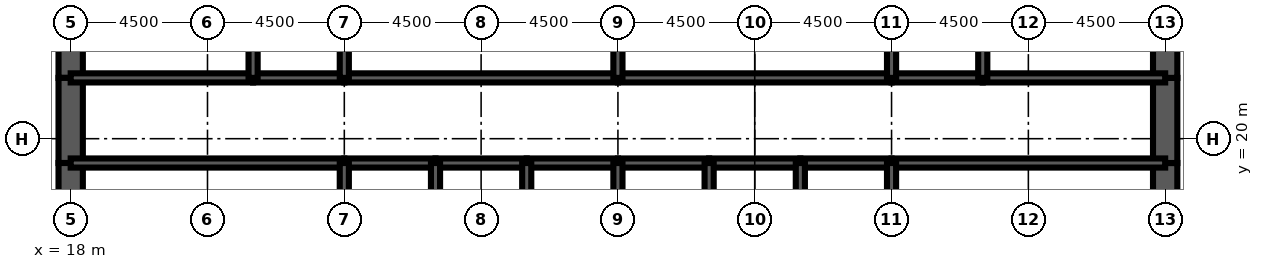
"""IFC4 building model, lengths in metres.
Left out: names, types, materials, properties, quantities, classifications, styles, units other than length and angle.
Written with IfcOpenShell. Run it as: python <this file> out.ifc"""

import sys

from ifc_helpers import new_model, si_unit, direction, frame, frame_2d, origin, place, context, subcontext, project, spatial, rectangle, extrude, element, fill, save


model = new_model("IFC4")
c1 = context("Model", 3, precision=1e-05, world=origin(), true_north=direction((0.0, 1.0)))
c2 = subcontext(c1, "Body", "Model", "MODEL_VIEW")
j1 = project(units=[si_unit("LENGTHUNIT", "METRE"), si_unit("PLANEANGLEUNIT", "RADIAN")], contexts=[c1])
p1 = place(None, origin())
s1 = spatial("IfcSite", under=j1, at=p1, CompositionType="ELEMENT")
p2 = place(p1, origin())
s2 = spatial("IfcBuilding", under=s1, at=p2, CompositionType="ELEMENT")
p3 = place(p2, frame((0.0, 0.0, 227.8)))
s3 = spatial("IfcBuildingStorey", under=s2, at=p3, CompositionType="ELEMENT", Elevation=227.8)
p4 = place(p3, frame((18.0, 26.0, 0.0), z_axis=(0.0, 0.0, 1.0), x_axis=(0.0, -1.0, 0.0)))
e1 = element("IfcWall", 1, at=p4, inside=s3, PredefinedType="SHEAR", context=c2, shape_type="SweptSolid", body=[
    extrude(rectangle(XDim=4.0, YDim=0.8, at=frame_2d((2.0, 0.0))), origin(), (0.0, 0.0, 1.0), 4.2),
])
p5 = place(p3, frame((18.0, 22.0, 0.0), z_axis=(0.0, 0.0, 1.0), x_axis=(0.0, -1.0, 0.0)))
e2 = element("IfcWall", 2, at=p5, inside=s3, PredefinedType="SHEAR", context=c2, shape_type="SweptSolid", body=[
    extrude(rectangle(XDim=2.8, YDim=0.8, at=frame_2d((1.4, 0.0))), origin(), (0.0, 0.0, 1.0), 4.2),
])
p6 = place(p5, frame((0.6, 0.0, 0.0)))
e3 = element("IfcOpeningElement", 3, at=p6, cuts=e2, PredefinedType="OPENING", context=c2, shape_type="SweptSolid", body=[
    extrude(rectangle(XDim=1.8, YDim=2.1, at=frame_2d((0.9, 1.05))), frame((0.0, 0.41, 0.0), z_axis=(0.0, -1.0, 0.0), x_axis=(1.0, 0.0, 0.0)), (0.0, 0.0, 1.0), 0.82),
])
for number, where, z_axis, x_axis in (
    (4, (18.0, 19.2, 0.0), (0.0, 0.0, 1.0), (0.0, -1.0, 0.0)),
    (5, (54.0, 16.0, 0.0), (0.0, 0.0, 1.0), (0.0, 1.0, 0.0)),
):
    element("IfcWall", number, at=place(p3, frame(where, z_axis=z_axis, x_axis=x_axis)), inside=s3, PredefinedType="SHEAR", context=c2, shape_type="SweptSolid", body=[
        extrude(rectangle(XDim=3.2, YDim=0.8, at=frame_2d((1.6, 0.0))), origin(), (0.0, 0.0, 1.0), 4.2),
    ])
p7 = place(p3, frame((54.0, 19.2, 0.0), z_axis=(0.0, 0.0, 1.0), x_axis=(0.0, 1.0, 0.0)))
e6 = element("IfcWall", 6, at=p7, inside=s3, PredefinedType="SHEAR", context=c2, shape_type="SweptSolid", body=[
    extrude(rectangle(XDim=2.8, YDim=0.8, at=frame_2d((1.4, 0.0))), origin(), (0.0, 0.0, 1.0), 4.2),
])
p8 = place(p7, frame((0.4, 0.0, 0.0)))
e7 = element("IfcOpeningElement", 7, at=p8, cuts=e6, PredefinedType="OPENING", context=c2, shape_type="SweptSolid", body=[
    extrude(rectangle(XDim=1.8, YDim=2.1, at=frame_2d((0.9, 1.05))), frame((0.0, 0.41, 0.0), z_axis=(0.0, -1.0, 0.0), x_axis=(1.0, 0.0, 0.0)), (0.0, 0.0, 1.0), 0.82),
])
p9 = place(p3, frame((54.0, 22.0, 0.0), z_axis=(0.0, 0.0, 1.0), x_axis=(0.0, 1.0, 0.0)))
e8 = element("IfcWall", 8, at=p9, inside=s3, PredefinedType="SHEAR", context=c2, shape_type="SweptSolid", body=[
    extrude(rectangle(XDim=4.0, YDim=0.8, at=frame_2d((2.0, 0.0))), origin(), (0.0, 0.0, 1.0), 4.2),
])
p10 = place(p3, frame((18.0, 19.2, 0.0), z_axis=(0.0, 0.0, 1.0), x_axis=(1.0, 0.0, 0.0)))
e9 = element("IfcWall", 9, at=p10, inside=s3, PredefinedType="SOLIDWALL", context=c2, shape_type="SweptSolid", body=[
    extrude(rectangle(XDim=9.0, YDim=0.3, at=frame_2d((4.5, 0.0))), origin(), (0.0, 0.0, 1.0), 4.2),
])
p11 = place(p10, frame((0.65, 0.0, 0.0)))
e10 = element("IfcOpeningElement", 10, at=p11, cuts=e9, PredefinedType="OPENING", context=c2, shape_type="SweptSolid", body=[
    extrude(rectangle(XDim=1.0, YDim=2.1, at=frame_2d((0.5, 1.05))), frame((0.0, 0.16, 0.0), z_axis=(0.0, -1.0, 0.0), x_axis=(1.0, 0.0, 0.0)), (0.0, 0.0, 1.0), 0.32),
])
p12 = place(p3, frame((27.0, 19.2, 0.0), z_axis=(0.0, 0.0, 1.0), x_axis=(1.0, 0.0, 0.0)))
e11 = element("IfcWall", 11, at=p12, inside=s3, PredefinedType="SOLIDWALL", context=c2, shape_type="SweptSolid", body=[
    extrude(rectangle(XDim=3.0, YDim=0.3, at=frame_2d((1.5, 0.0))), origin(), (0.0, 0.0, 1.0), 4.2),
])
p13 = place(p12, frame((0.95, 0.0, 0.0)))
e12 = element("IfcOpeningElement", 12, at=p13, cuts=e11, PredefinedType="OPENING", context=c2, shape_type="SweptSolid", body=[
    extrude(rectangle(XDim=1.1, YDim=2.2, at=frame_2d((0.55, 1.1))), frame((0.0, 0.16, 0.0), z_axis=(0.0, -1.0, 0.0), x_axis=(1.0, 0.0, 0.0)), (0.0, 0.0, 1.0), 0.32),
])
p14 = place(p3, frame((30.0, 19.2, 0.0), z_axis=(0.0, 0.0, 1.0), x_axis=(1.0, 0.0, 0.0)))
e13 = element("IfcWall", 13, at=p14, inside=s3, PredefinedType="SOLIDWALL", context=c2, shape_type="SweptSolid", body=[
    extrude(rectangle(XDim=3.0, YDim=0.3, at=frame_2d((1.5, 0.0))), origin(), (0.0, 0.0, 1.0), 4.2),
])
p15 = place(p14, frame((0.95, 0.0, 0.0)))
e14 = element("IfcOpeningElement", 14, at=p15, cuts=e13, PredefinedType="OPENING", context=c2, shape_type="SweptSolid", body=[
    extrude(rectangle(XDim=1.1, YDim=2.2, at=frame_2d((0.55, 1.1))), frame((0.0, 0.16, 0.0), z_axis=(0.0, -1.0, 0.0), x_axis=(1.0, 0.0, 0.0)), (0.0, 0.0, 1.0), 0.32),
])
p16 = place(p3, frame((33.0, 19.2, 0.0), z_axis=(0.0, 0.0, 1.0), x_axis=(1.0, 0.0, 0.0)))
e15 = element("IfcWall", 15, at=p16, inside=s3, PredefinedType="SOLIDWALL", context=c2, shape_type="SweptSolid", body=[
    extrude(rectangle(XDim=3.0, YDim=0.3, at=frame_2d((1.5, 0.0))), origin(), (0.0, 0.0, 1.0), 4.2),
])
p17 = place(p16, frame((0.95, 0.0, 0.0)))
e16 = element("IfcOpeningElement", 16, at=p17, cuts=e15, PredefinedType="OPENING", context=c2, shape_type="SweptSolid", body=[
    extrude(rectangle(XDim=1.1, YDim=2.2, at=frame_2d((0.55, 1.1))), frame((0.0, 0.16, 0.0), z_axis=(0.0, -1.0, 0.0), x_axis=(1.0, 0.0, 0.0)), (0.0, 0.0, 1.0), 0.32),
])
p18 = place(p3, frame((36.0, 19.2, 0.0), z_axis=(0.0, 0.0, 1.0), x_axis=(1.0, 0.0, 0.0)))
e17 = element("IfcWall", 17, at=p18, inside=s3, PredefinedType="SOLIDWALL", context=c2, shape_type="SweptSolid", body=[
    extrude(rectangle(XDim=3.0, YDim=0.3, at=frame_2d((1.5, 0.0))), origin(), (0.0, 0.0, 1.0), 4.2),
])
p19 = place(p18, frame((0.95, 0.0, 0.0)))
e18 = element("IfcOpeningElement", 18, at=p19, cuts=e17, PredefinedType="OPENING", context=c2, shape_type="SweptSolid", body=[
    extrude(rectangle(XDim=1.1, YDim=2.2, at=frame_2d((0.55, 1.1))), frame((0.0, 0.16, 0.0), z_axis=(0.0, -1.0, 0.0), x_axis=(1.0, 0.0, 0.0)), (0.0, 0.0, 1.0), 0.32),
])
p20 = place(p3, frame((39.0, 19.2, 0.0), z_axis=(0.0, 0.0, 1.0), x_axis=(1.0, 0.0, 0.0)))
e19 = element("IfcWall", 19, at=p20, inside=s3, PredefinedType="SOLIDWALL", context=c2, shape_type="SweptSolid", body=[
    extrude(rectangle(XDim=3.0, YDim=0.3, at=frame_2d((1.5, 0.0))), origin(), (0.0, 0.0, 1.0), 4.2),
])
p21 = place(p20, frame((1.0, 0.0, 0.0)))
e20 = element("IfcOpeningElement", 20, at=p21, cuts=e19, PredefinedType="OPENING", context=c2, shape_type="SweptSolid", body=[
    extrude(rectangle(XDim=1.0, YDim=2.1, at=frame_2d((0.5, 1.05))), frame((0.0, 0.16, 0.0), z_axis=(0.0, -1.0, 0.0), x_axis=(1.0, 0.0, 0.0)), (0.0, 0.0, 1.0), 0.32),
])
p22 = place(p3, frame((42.0, 19.2, 0.0), z_axis=(0.0, 0.0, 1.0), x_axis=(1.0, 0.0, 0.0)))
e21 = element("IfcWall", 21, at=p22, inside=s3, PredefinedType="SOLIDWALL", context=c2, shape_type="SweptSolid", body=[
    extrude(rectangle(XDim=3.0, YDim=0.3, at=frame_2d((1.5, 0.0))), origin(), (0.0, 0.0, 1.0), 4.2),
])
p23 = place(p22, frame((1.0, 0.0, 0.0)))
e22 = element("IfcOpeningElement", 22, at=p23, cuts=e21, PredefinedType="OPENING", context=c2, shape_type="SweptSolid", body=[
    extrude(rectangle(XDim=1.0, YDim=2.1, at=frame_2d((0.5, 1.05))), frame((0.0, 0.16, 0.0), z_axis=(0.0, -1.0, 0.0), x_axis=(1.0, 0.0, 0.0)), (0.0, 0.0, 1.0), 0.32),
])
p24 = place(p3, frame((45.0, 19.2, 0.0), z_axis=(0.0, 0.0, 1.0), x_axis=(1.0, 0.0, 0.0)))
e23 = element("IfcWall", 23, at=p24, inside=s3, PredefinedType="SOLIDWALL", context=c2, shape_type="SweptSolid", body=[
    extrude(rectangle(XDim=9.0, YDim=0.3, at=frame_2d((4.5, 0.0))), origin(), (0.0, 0.0, 1.0), 4.2),
])
p25 = place(p24, frame((7.35, 0.0, 0.0)))
e24 = element("IfcOpeningElement", 24, at=p25, cuts=e23, PredefinedType="OPENING", context=c2, shape_type="SweptSolid", body=[
    extrude(rectangle(XDim=1.0, YDim=2.1, at=frame_2d((0.5, 1.05))), frame((0.0, 0.16, 0.0), z_axis=(0.0, -1.0, 0.0), x_axis=(1.0, 0.0, 0.0)), (0.0, 0.0, 1.0), 0.32),
])
p26 = place(p3, frame((18.0, 22.0, 0.0), z_axis=(0.0, 0.0, 1.0), x_axis=(1.0, 0.0, 0.0)))
e25 = element("IfcWall", 25, at=p26, inside=s3, PredefinedType="SOLIDWALL", context=c2, shape_type="SweptSolid", body=[
    extrude(rectangle(XDim=6.0, YDim=0.3, at=frame_2d((3.0, 0.0))), origin(), (0.0, 0.0, 1.0), 4.2),
])
p27 = place(p26, frame((4.4, 0.0, 0.0)))
e26 = element("IfcOpeningElement", 26, at=p27, cuts=e25, PredefinedType="OPENING", context=c2, shape_type="SweptSolid", body=[
    extrude(rectangle(XDim=1.0, YDim=2.1, at=frame_2d((0.5, 1.05))), frame((0.0, 0.16, 0.0), z_axis=(0.0, -1.0, 0.0), x_axis=(1.0, 0.0, 0.0)), (0.0, 0.0, 1.0), 0.32),
])
p28 = place(p26, frame((0.65, 0.0, 0.0)))
e27 = element("IfcOpeningElement", 27, at=p28, cuts=e25, PredefinedType="OPENING", context=c2, shape_type="SweptSolid", body=[
    extrude(rectangle(XDim=1.0, YDim=2.1, at=frame_2d((0.5, 1.05))), frame((0.0, 0.16, 0.0), z_axis=(0.0, -1.0, 0.0), x_axis=(1.0, 0.0, 0.0)), (0.0, 0.0, 1.0), 0.32),
])
p29 = place(p3, frame((24.0, 22.0, 0.0), z_axis=(0.0, 0.0, 1.0), x_axis=(1.0, 0.0, 0.0)))
e28 = element("IfcWall", 28, at=p29, inside=s3, PredefinedType="SOLIDWALL", context=c2, shape_type="SweptSolid", body=[
    extrude(rectangle(XDim=3.0, YDim=0.3, at=frame_2d((1.5, 0.0))), origin(), (0.0, 0.0, 1.0), 4.2),
])
p30 = place(p29, frame((1.0, 0.0, 0.0)))
e29 = element("IfcOpeningElement", 29, at=p30, cuts=e28, PredefinedType="OPENING", context=c2, shape_type="SweptSolid", body=[
    extrude(rectangle(XDim=1.0, YDim=2.1, at=frame_2d((0.5, 1.05))), frame((0.0, 0.16, 0.0), z_axis=(0.0, -1.0, 0.0), x_axis=(1.0, 0.0, 0.0)), (0.0, 0.0, 1.0), 0.32),
])
p31 = place(p3, frame((27.0, 22.0, 0.0), z_axis=(0.0, 0.0, 1.0), x_axis=(1.0, 0.0, 0.0)))
e30 = element("IfcWall", 30, at=p31, inside=s3, PredefinedType="SOLIDWALL", context=c2, shape_type="SweptSolid", body=[
    extrude(rectangle(XDim=9.0, YDim=0.3, at=frame_2d((4.5, 0.0))), origin(), (0.0, 0.0, 1.0), 4.2),
])
p32 = place(p31, frame((4.0, 0.0, 0.0)))
e31 = element("IfcOpeningElement", 31, at=p32, cuts=e30, PredefinedType="OPENING", context=c2, shape_type="SweptSolid", body=[
    extrude(rectangle(XDim=1.0, YDim=2.1, at=frame_2d((0.5, 1.05))), frame((0.0, 0.16, 0.0), z_axis=(0.0, -1.0, 0.0), x_axis=(1.0, 0.0, 0.0)), (0.0, 0.0, 1.0), 0.32),
])
p33 = place(p3, frame((36.0, 22.0, 0.0), z_axis=(0.0, 0.0, 1.0), x_axis=(1.0, 0.0, 0.0)))
e32 = element("IfcWall", 32, at=p33, inside=s3, PredefinedType="SOLIDWALL", context=c2, shape_type="SweptSolid", body=[
    extrude(rectangle(XDim=9.0, YDim=0.3, at=frame_2d((4.5, 0.0))), origin(), (0.0, 0.0, 1.0), 4.2),
])
p34 = place(p33, frame((4.0, 0.0, 0.0)))
e33 = element("IfcOpeningElement", 33, at=p34, cuts=e32, PredefinedType="OPENING", context=c2, shape_type="SweptSolid", body=[
    extrude(rectangle(XDim=1.0, YDim=2.1, at=frame_2d((0.5, 1.05))), frame((0.0, 0.16, 0.0), z_axis=(0.0, -1.0, 0.0), x_axis=(1.0, 0.0, 0.0)), (0.0, 0.0, 1.0), 0.32),
])
p35 = place(p3, frame((45.0, 22.0, 0.0), z_axis=(0.0, 0.0, 1.0), x_axis=(1.0, 0.0, 0.0)))
e34 = element("IfcWall", 34, at=p35, inside=s3, PredefinedType="SOLIDWALL", context=c2, shape_type="SweptSolid", body=[
    extrude(rectangle(XDim=3.0, YDim=0.3, at=frame_2d((1.5, 0.0))), origin(), (0.0, 0.0, 1.0), 4.2),
])
p36 = place(p35, frame((1.0, 0.0, 0.0)))
e35 = element("IfcOpeningElement", 35, at=p36, cuts=e34, PredefinedType="OPENING", context=c2, shape_type="SweptSolid", body=[
    extrude(rectangle(XDim=1.0, YDim=2.1, at=frame_2d((0.5, 1.05))), frame((0.0, 0.16, 0.0), z_axis=(0.0, -1.0, 0.0), x_axis=(1.0, 0.0, 0.0)), (0.0, 0.0, 1.0), 0.32),
])
p37 = place(p3, frame((48.0, 22.0, 0.0), z_axis=(0.0, 0.0, 1.0), x_axis=(1.0, 0.0, 0.0)))
e36 = element("IfcWall", 36, at=p37, inside=s3, PredefinedType="SOLIDWALL", context=c2, shape_type="SweptSolid", body=[
    extrude(rectangle(XDim=6.0, YDim=0.3, at=frame_2d((3.0, 0.0))), origin(), (0.0, 0.0, 1.0), 4.2),
])
p38 = place(p37, frame((2.0, 0.0, 0.0)))
e37 = element("IfcOpeningElement", 37, at=p38, cuts=e36, PredefinedType="OPENING", context=c2, shape_type="SweptSolid", body=[
    extrude(rectangle(XDim=1.0, YDim=2.1, at=frame_2d((0.5, 1.05))), frame((0.0, 0.16, 0.0), z_axis=(0.0, -1.0, 0.0), x_axis=(1.0, 0.0, 0.0)), (0.0, 0.0, 1.0), 0.32),
])
p39 = place(p37, frame((4.35, 0.0, 0.0)))
e38 = element("IfcOpeningElement", 38, at=p39, cuts=e36, PredefinedType="OPENING", context=c2, shape_type="SweptSolid", body=[
    extrude(rectangle(XDim=1.0, YDim=2.1, at=frame_2d((0.5, 1.05))), frame((0.0, 0.16, 0.0), z_axis=(0.0, -1.0, 0.0), x_axis=(1.0, 0.0, 0.0)), (0.0, 0.0, 1.0), 0.32),
])
for number, where, z_axis, x_axis in (
    (39, (27.0, 16.0, 0.0), (0.0, 0.0, 1.0), (0.0, 1.0, 0.0)),
    (40, (30.0, 16.0, 0.0), (0.0, 0.0, 1.0), (0.0, 1.0, 0.0)),
    (41, (33.0, 16.0, 0.0), (0.0, 0.0, 1.0), (0.0, 1.0, 0.0)),
    (42, (36.0, 16.0, 0.0), (0.0, 0.0, 1.0), (0.0, 1.0, 0.0)),
    (43, (39.0, 16.0, 0.0), (0.0, 0.0, 1.0), (0.0, 1.0, 0.0)),
    (44, (42.0, 16.0, 0.0), (0.0, 0.0, 1.0), (0.0, 1.0, 0.0)),
    (45, (45.0, 16.0, 0.0), (0.0, 0.0, 1.0), (0.0, 1.0, 0.0)),
):
    element("IfcWall", number, at=place(p3, frame(where, z_axis=z_axis, x_axis=x_axis)), inside=s3, PredefinedType="SOLIDWALL", context=c2, shape_type="SweptSolid", body=[
        extrude(rectangle(XDim=3.2, YDim=0.3, at=frame_2d((1.6, 0.0))), origin(), (0.0, 0.0, 1.0), 4.2),
    ])
for number, where, z_axis, x_axis in (
    (46, (24.0, 22.0, 0.0), (0.0, 0.0, 1.0), (0.0, 1.0, 0.0)),
    (47, (27.0, 22.0, 0.0), (0.0, 0.0, 1.0), (0.0, 1.0, 0.0)),
    (48, (36.0, 22.0, 0.0), (0.0, 0.0, 1.0), (0.0, 1.0, 0.0)),
    (49, (45.0, 22.0, 0.0), (0.0, 0.0, 1.0), (0.0, 1.0, 0.0)),
    (50, (48.0, 22.0, 0.0), (0.0, 0.0, 1.0), (0.0, 1.0, 0.0)),
):
    element("IfcWall", number, at=place(p3, frame(where, z_axis=z_axis, x_axis=x_axis)), inside=s3, PredefinedType="SOLIDWALL", context=c2, shape_type="SweptSolid", body=[
        extrude(rectangle(XDim=4.0, YDim=0.3, at=frame_2d((2.0, 0.0))), origin(), (0.0, 0.0, 1.0), 4.2),
    ])
p40 = place(p3, frame((42.5, 22.15, 0.0), z_axis=(0.0, 0.0, 1.0), x_axis=(0.0, 1.0, 0.0)))
e51 = element("IfcWall", 51, at=p40, inside=s3, PredefinedType="PARTITIONING", context=c2, shape_type="SweptSolid", body=[
    extrude(rectangle(XDim=3.7, YDim=0.15, at=frame_2d((1.85, 0.0))), origin(), (0.0, 0.0, 1.0), 3.0),
])
p41 = place(p40, frame((2.2, 0.0, 0.0)))
e52 = element("IfcOpeningElement", 52, at=p41, cuts=e51, PredefinedType="OPENING", context=c2, shape_type="SweptSolid", body=[
    extrude(rectangle(XDim=1.0, YDim=2.1, at=frame_2d((0.5, 1.05))), frame((0.0, 0.085, 0.0), z_axis=(0.0, -1.0, 0.0), x_axis=(1.0, 0.0, 0.0)), (0.0, 0.0, 1.0), 0.17),
])
for number, where, z_axis, x_axis in (
    (53, (19.975, 22.15, 0.0), (0.0, 0.0, 1.0), (0.0, 1.0, 0.0)),
    (54, (52.025, 22.15, 0.0), (0.0, 0.0, 1.0), (0.0, 1.0, 0.0)),
):
    element("IfcWall", number, at=place(p3, frame(where, z_axis=z_axis, x_axis=x_axis)), inside=s3, PredefinedType="PARTITIONING", context=c2, shape_type="SweptSolid", body=[
        extrude(rectangle(XDim=3.7, YDim=0.15, at=frame_2d((1.85, 0.0))), origin(), (0.0, 0.0, 1.0), 3.0),
    ])
p42 = place(p13, origin())
e55 = element("IfcDoor", 55, at=p42, inside=s3, OperationType="DOUBLE_DOOR_SLIDING", PredefinedType="USERDEFINED", context=c2, shape_type="SweptSolid", body=[
    extrude(rectangle(XDim=1.1, YDim=2.2, at=frame_2d((0.55, 1.1))), frame((0.0, 0.025, 0.0), z_axis=(0.0, -1.0, 0.0), x_axis=(1.0, 0.0, 0.0)), (0.0, 0.0, 1.0), 0.05),
])
fill(e12, e55)
p43 = place(p15, origin())
e56 = element("IfcDoor", 56, at=p43, inside=s3, OperationType="DOUBLE_DOOR_SLIDING", PredefinedType="USERDEFINED", context=c2, shape_type="SweptSolid", body=[
    extrude(rectangle(XDim=1.1, YDim=2.2, at=frame_2d((0.55, 1.1))), frame((0.0, 0.025, 0.0), z_axis=(0.0, -1.0, 0.0), x_axis=(1.0, 0.0, 0.0)), (0.0, 0.0, 1.0), 0.05),
])
fill(e14, e56)
p44 = place(p17, origin())
e57 = element("IfcDoor", 57, at=p44, inside=s3, OperationType="DOUBLE_DOOR_SLIDING", PredefinedType="USERDEFINED", context=c2, shape_type="SweptSolid", body=[
    extrude(rectangle(XDim=1.1, YDim=2.2, at=frame_2d((0.55, 1.1))), frame((0.0, 0.025, 0.0), z_axis=(0.0, -1.0, 0.0), x_axis=(1.0, 0.0, 0.0)), (0.0, 0.0, 1.0), 0.05),
])
fill(e16, e57)
p45 = place(p19, origin())
e58 = element("IfcDoor", 58, at=p45, inside=s3, OperationType="DOUBLE_DOOR_SLIDING", PredefinedType="USERDEFINED", context=c2, shape_type="SweptSolid", body=[
    extrude(rectangle(XDim=1.1, YDim=2.2, at=frame_2d((0.55, 1.1))), frame((0.0, 0.025, 0.0), z_axis=(0.0, -1.0, 0.0), x_axis=(1.0, 0.0, 0.0)), (0.0, 0.0, 1.0), 0.05),
])
fill(e18, e58)
p46 = place(p11, origin())
e59 = element("IfcDoor", 59, at=p46, inside=s3, OperationType="SINGLE_SWING_LEFT", PredefinedType="DOOR", context=c2, shape_type="SweptSolid", body=[
    extrude(rectangle(XDim=1.0, YDim=2.1, at=frame_2d((0.5, 1.05))), frame((0.0, 0.025, 0.0), z_axis=(0.0, -1.0, 0.0), x_axis=(1.0, 0.0, 0.0)), (0.0, 0.0, 1.0), 0.05),
])
fill(e10, e59)
p47 = place(p25, origin())
e60 = element("IfcDoor", 60, at=p47, inside=s3, OperationType="SINGLE_SWING_RIGHT", PredefinedType="DOOR", context=c2, shape_type="SweptSolid", body=[
    extrude(rectangle(XDim=1.0, YDim=2.1, at=frame_2d((0.5, 1.05))), frame((0.0, 0.025, 0.0), z_axis=(0.0, -1.0, 0.0), x_axis=(1.0, 0.0, 0.0)), (0.0, 0.0, 1.0), 0.05),
])
fill(e24, e60)
p48 = place(p6, origin())
e61 = element("IfcDoor", 61, at=p48, inside=s3, OperationType="SINGLE_SWING_LEFT", PredefinedType="DOOR", context=c2, shape_type="SweptSolid", body=[
    extrude(rectangle(XDim=1.8, YDim=2.1, at=frame_2d((0.9, 1.05))), frame((0.0, 0.4, 0.0), z_axis=(0.0, -1.0, 0.0), x_axis=(1.0, 0.0, 0.0)), (0.0, 0.0, 1.0), 0.8),
])
fill(e3, e61)
p49 = place(p8, origin())
e62 = element("IfcDoor", 62, at=p49, inside=s3, OperationType="SINGLE_SWING_LEFT", PredefinedType="DOOR", context=c2, shape_type="SweptSolid", body=[
    extrude(rectangle(XDim=1.8, YDim=2.1, at=frame_2d((0.9, 1.05))), frame((0.0, 0.4, 0.0), z_axis=(0.0, -1.0, 0.0), x_axis=(1.0, 0.0, 0.0)), (0.0, 0.0, 1.0), 0.8),
])
fill(e7, e62)
p50 = place(p27, origin())
e63 = element("IfcDoor", 63, at=p50, inside=s3, OperationType="SINGLE_SWING_RIGHT", PredefinedType="DOOR", context=c2, shape_type="SweptSolid", body=[
    extrude(rectangle(XDim=1.0, YDim=2.1, at=frame_2d((0.5, 1.05))), frame((0.0, 0.025, 0.0), z_axis=(0.0, -1.0, 0.0), x_axis=(1.0, 0.0, 0.0)), (0.0, 0.0, 1.0), 0.05),
])
fill(e26, e63)
p51 = place(p30, origin())
e64 = element("IfcDoor", 64, at=p51, inside=s3, OperationType="SINGLE_SWING_LEFT", PredefinedType="DOOR", context=c2, shape_type="SweptSolid", body=[
    extrude(rectangle(XDim=1.0, YDim=2.1, at=frame_2d((0.5, 1.05))), frame((0.0, 0.025, 0.0), z_axis=(0.0, -1.0, 0.0), x_axis=(1.0, 0.0, 0.0)), (0.0, 0.0, 1.0), 0.05),
])
fill(e29, e64)
p52 = place(p32, origin())
e65 = element("IfcDoor", 65, at=p52, inside=s3, OperationType="SINGLE_SWING_LEFT", PredefinedType="DOOR", context=c2, shape_type="SweptSolid", body=[
    extrude(rectangle(XDim=1.0, YDim=2.1, at=frame_2d((0.5, 1.05))), frame((0.0, 0.025, 0.0), z_axis=(0.0, -1.0, 0.0), x_axis=(1.0, 0.0, 0.0)), (0.0, 0.0, 1.0), 0.05),
])
fill(e31, e65)
p53 = place(p34, origin())
e66 = element("IfcDoor", 66, at=p53, inside=s3, OperationType="SINGLE_SWING_LEFT", PredefinedType="DOOR", context=c2, shape_type="SweptSolid", body=[
    extrude(rectangle(XDim=1.0, YDim=2.1, at=frame_2d((0.5, 1.05))), frame((0.0, 0.025, 0.0), z_axis=(0.0, -1.0, 0.0), x_axis=(1.0, 0.0, 0.0)), (0.0, 0.0, 1.0), 0.05),
])
fill(e33, e66)
p54 = place(p36, origin())
e67 = element("IfcDoor", 67, at=p54, inside=s3, OperationType="SINGLE_SWING_LEFT", PredefinedType="DOOR", context=c2, shape_type="SweptSolid", body=[
    extrude(rectangle(XDim=1.0, YDim=2.1, at=frame_2d((0.5, 1.05))), frame((0.0, 0.025, 0.0), z_axis=(0.0, -1.0, 0.0), x_axis=(1.0, 0.0, 0.0)), (0.0, 0.0, 1.0), 0.05),
])
fill(e35, e67)
p55 = place(p38, origin())
e68 = element("IfcDoor", 68, at=p55, inside=s3, OperationType="SINGLE_SWING_LEFT", PredefinedType="DOOR", context=c2, shape_type="SweptSolid", body=[
    extrude(rectangle(XDim=1.0, YDim=2.1, at=frame_2d((0.5, 1.05))), frame((0.0, 0.025, 0.0), z_axis=(0.0, -1.0, 0.0), x_axis=(1.0, 0.0, 0.0)), (0.0, 0.0, 1.0), 0.05),
])
fill(e37, e68)
p56 = place(p28, origin())
e69 = element("IfcDoor", 69, at=p56, inside=s3, OperationType="SINGLE_SWING_LEFT", PredefinedType="DOOR", context=c2, shape_type="SweptSolid", body=[
    extrude(rectangle(XDim=1.0, YDim=2.1, at=frame_2d((0.5, 1.05))), frame((0.0, 0.025, 0.0), z_axis=(0.0, -1.0, 0.0), x_axis=(1.0, 0.0, 0.0)), (0.0, 0.0, 1.0), 0.05),
])
fill(e27, e69)
p57 = place(p39, origin())
e70 = element("IfcDoor", 70, at=p57, inside=s3, OperationType="SINGLE_SWING_RIGHT", PredefinedType="DOOR", context=c2, shape_type="SweptSolid", body=[
    extrude(rectangle(XDim=1.0, YDim=2.1, at=frame_2d((0.5, 1.05))), frame((0.0, 0.025, 0.0), z_axis=(0.0, -1.0, 0.0), x_axis=(1.0, 0.0, 0.0)), (0.0, 0.0, 1.0), 0.05),
])
fill(e38, e70)
p58 = place(p21, origin())
e71 = element("IfcDoor", 71, at=p58, inside=s3, OperationType="SINGLE_SWING_LEFT", PredefinedType="DOOR", context=c2, shape_type="SweptSolid", body=[
    extrude(rectangle(XDim=1.0, YDim=2.1, at=frame_2d((0.5, 1.05))), frame((0.0, 0.025, 0.0), z_axis=(0.0, -1.0, 0.0), x_axis=(1.0, 0.0, 0.0)), (0.0, 0.0, 1.0), 0.05),
])
fill(e20, e71)
p59 = place(p23, origin())
e72 = element("IfcDoor", 72, at=p59, inside=s3, OperationType="SINGLE_SWING_LEFT", PredefinedType="DOOR", context=c2, shape_type="SweptSolid", body=[
    extrude(rectangle(XDim=1.0, YDim=2.1, at=frame_2d((0.5, 1.05))), frame((0.0, 0.025, 0.0), z_axis=(0.0, -1.0, 0.0), x_axis=(1.0, 0.0, 0.0)), (0.0, 0.0, 1.0), 0.05),
])
fill(e22, e72)
save(model, sys.argv[1])
